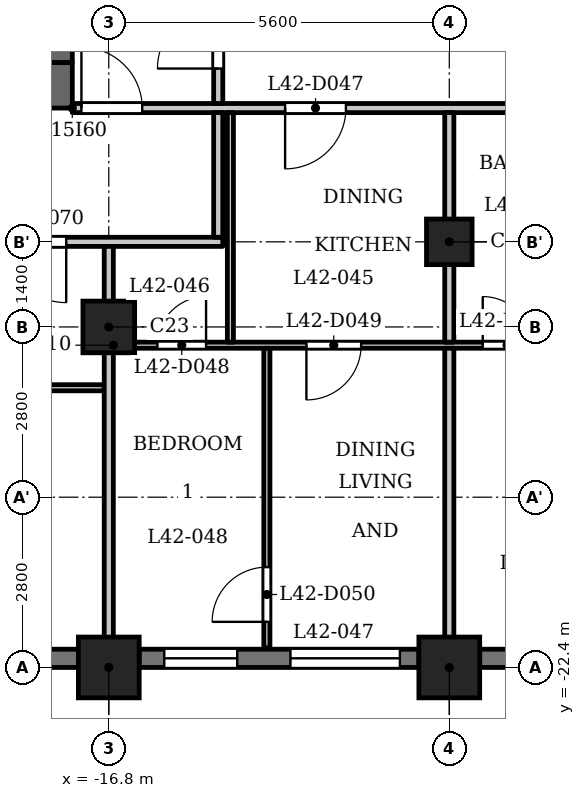
"""IFC4 building model, lengths in metres.
Left out: names, types, materials, properties, quantities, classifications, styles, units other than length and angle.
Written with IfcOpenShell. Run it as: python <this file> out.ifc"""

import sys

from ifc_helpers import new_model, si_unit, direction, frame, frame_2d, origin, origin_2d, place, context, subcontext, project, spatial, rectangle, extrude, element, fill, save


model = new_model("IFC4")
c1 = context("Model", 3, precision=1e-05, world=origin(), true_north=direction((0.0, 1.0)))
c2 = subcontext(c1, "Body", "Model", "MODEL_VIEW")
j1 = project(units=[si_unit("LENGTHUNIT", "METRE"), si_unit("PLANEANGLEUNIT", "RADIAN")], contexts=[c1])
p1 = place(None, origin())
s1 = spatial("IfcSite", under=j1, at=p1, CompositionType="ELEMENT")
p2 = place(p1, origin())
s2 = spatial("IfcBuilding", under=s1, at=p2, CompositionType="ELEMENT")
p3 = place(p2, frame((0.0, 0.0, 164.1)))
s3 = spatial("IfcBuildingStorey", under=s2, at=p3, CompositionType="ELEMENT", Elevation=164.1)
for number, where, z_axis, x_axis in (
    (1, (-16.8, -22.4, 0.0), (0.0, 0.0, 1.0), (1.0, 0.0, 0.0)),
    (2, (-11.2, -22.4, 0.0), (0.0, 0.0, 1.0), (1.0, 0.0, 0.0)),
):
    element("IfcColumn", number, at=place(p3, frame(where, z_axis=z_axis, x_axis=x_axis)), inside=s3, PredefinedType="COLUMN", context=c2, shape_type="SweptSolid", body=[
        extrude(rectangle(XDim=1.0, YDim=1.0, at=origin_2d()), origin(), (0.0, 0.0, 1.0), 3.5),
    ])
p4 = place(p3, frame((-16.8, -16.8, 0.0), z_axis=(0.0, 0.0, 1.0), x_axis=(1.0, 0.0, 0.0)))
e3 = element("IfcColumn", 3, at=p4, inside=s3, PredefinedType="COLUMN", context=c2, shape_type="SweptSolid", body=[
    extrude(rectangle(XDim=0.85, YDim=0.85, at=origin_2d()), origin(), (0.0, 0.0, 1.0), 3.5),
])
p5 = place(p3, frame((-11.2, -15.4, 0.0), z_axis=(0.0, 0.0, 1.0), x_axis=(1.0, 0.0, 0.0)))
e4 = element("IfcColumn", 4, at=p5, inside=s3, PredefinedType="COLUMN", context=c2, shape_type="SweptSolid", body=[
    extrude(rectangle(XDim=0.75, YDim=0.75, at=origin_2d()), origin(), (0.0, 0.0, 1.0), 3.5),
])
p6 = place(p3, frame((-20.0, -22.25, 0.0), z_axis=(0.0, 0.0, 1.0), x_axis=(1.0, 0.0, 0.0)))
e5 = element("IfcWall", 5, at=p6, inside=s3, PredefinedType="SOLIDWALL", context=c2, shape_type="SweptSolid", body=[
    extrude(rectangle(XDim=2.7, YDim=0.3, at=frame_2d((1.35, 0.0))), origin(), (0.0, 0.0, 1.0), 2.45),
])
p7 = place(p6, frame((0.75, 0.0, 0.6)))
e6 = element("IfcOpeningElement", 6, at=p7, cuts=e5, PredefinedType="OPENING", context=c2, shape_type="SweptSolid", body=[
    extrude(rectangle(XDim=1.2, YDim=1.55, at=frame_2d((0.6, 0.775))), frame((0.0, 0.16, 0.0), z_axis=(0.0, -1.0, 0.0), x_axis=(1.0, 0.0, 0.0)), (0.0, 0.0, 1.0), 0.32),
])
p8 = place(p3, frame((-16.3, -22.25, 0.0), z_axis=(0.0, 0.0, 1.0), x_axis=(1.0, 0.0, 0.0)))
e7 = element("IfcWall", 7, at=p8, inside=s3, PredefinedType="SOLIDWALL", context=c2, shape_type="SweptSolid", body=[
    extrude(rectangle(XDim=4.6, YDim=0.3, at=frame_2d((2.3, 0.0))), origin(), (0.0, 0.0, 1.0), 2.45),
])
p9 = place(p8, frame((0.413, 0.0, 0.6)))
e8 = element("IfcOpeningElement", 8, at=p9, cuts=e7, PredefinedType="OPENING", context=c2, shape_type="SweptSolid", body=[
    extrude(rectangle(XDim=1.2, YDim=1.55, at=frame_2d((0.6, 0.775))), frame((0.0, 0.16, 0.0), z_axis=(0.0, -1.0, 0.0), x_axis=(1.0, 0.0, 0.0)), (0.0, 0.0, 1.0), 0.32),
])
p10 = place(p8, frame((2.488, 0.0, 0.9)))
e9 = element("IfcOpeningElement", 9, at=p10, cuts=e7, PredefinedType="OPENING", context=c2, shape_type="SweptSolid", body=[
    extrude(rectangle(XDim=1.8, YDim=1.25, at=frame_2d((0.9, 0.625))), frame((0.0, 0.16, 0.0), z_axis=(0.0, -1.0, 0.0), x_axis=(1.0, 0.0, 0.0)), (0.0, 0.0, 1.0), 0.32),
])
p11 = place(p3, frame((-10.7, -22.25, 0.0), z_axis=(0.0, 0.0, 1.0), x_axis=(1.0, 0.0, 0.0)))
e10 = element("IfcWall", 10, at=p11, inside=s3, PredefinedType="SOLIDWALL", context=c2, shape_type="SweptSolid", body=[
    extrude(rectangle(XDim=4.6, YDim=0.3, at=frame_2d((2.3, 0.0))), origin(), (0.0, 0.0, 1.0), 2.45),
])
p12 = place(p11, frame((0.5, 0.0, 1.2)))
e11 = element("IfcOpeningElement", 11, at=p12, cuts=e10, PredefinedType="OPENING", context=c2, shape_type="SweptSolid", body=[
    extrude(rectangle(XDim=3.6, YDim=0.95, at=frame_2d((1.8, 0.475))), frame((0.0, 0.16, 0.0), z_axis=(0.0, -1.0, 0.0), x_axis=(1.0, 0.0, 0.0)), (0.0, 0.0, 1.0), 0.32),
])
p13 = place(p3, frame((-17.4, -12.825, 0.0), z_axis=(0.0, 0.0, 1.0), x_axis=(-1.0, 0.0, 0.0)))
e12 = element("IfcWall", 12, at=p13, inside=s3, PredefinedType="SHEAR", context=c2, shape_type="SweptSolid", body=[
    extrude(rectangle(XDim=10.4, YDim=0.75, at=frame_2d((5.2, 0.0))), origin(), (0.0, 0.0, 1.0), 3.2),
])
p14 = place(p3, frame((-17.6, -12.45, 0.0), z_axis=(0.0, 0.0, 1.0), x_axis=(0.0, 1.0, 0.0)))
e13 = element("IfcWall", 13, at=p14, inside=s3, PredefinedType="SHEAR", context=c2, shape_type="SweptSolid", body=[
    extrude(rectangle(XDim=24.9, YDim=0.4, at=frame_2d((12.45, 0.0))), origin(), (0.0, 0.0, 1.0), 3.2),
])
p15 = place(p14, frame((8.65, 0.0, 0.0)))
e14 = element("IfcOpeningElement", 14, at=p15, cuts=e13, PredefinedType="OPENING", context=c2, shape_type="SweptSolid", body=[
    extrude(rectangle(XDim=0.9, YDim=2.1, at=frame_2d((0.45, 1.05))), frame((0.0, 0.21, 0.0), z_axis=(0.0, -1.0, 0.0), x_axis=(1.0, 0.0, 0.0)), (0.0, 0.0, 1.0), 0.42),
])
p16 = place(p14, frame((15.6, 0.0, 0.0)))
e15 = element("IfcOpeningElement", 15, at=p16, cuts=e13, PredefinedType="OPENING", context=c2, shape_type="SweptSolid", body=[
    extrude(rectangle(XDim=1.1, YDim=2.1, at=frame_2d((0.55, 1.05))), frame((0.0, 0.21, 0.0), z_axis=(0.0, -1.0, 0.0), x_axis=(1.0, 0.0, 0.0)), (0.0, 0.0, 1.0), 0.42),
])
p17 = place(p14, frame((18.0, 0.0, 0.0)))
e16 = element("IfcOpeningElement", 16, at=p17, cuts=e13, PredefinedType="OPENING", context=c2, shape_type="SweptSolid", body=[
    extrude(rectangle(XDim=1.1, YDim=2.1, at=frame_2d((0.55, 1.05))), frame((0.0, 0.21, 0.0), z_axis=(0.0, -1.0, 0.0), x_axis=(1.0, 0.0, 0.0)), (0.0, 0.0, 1.0), 0.42),
])
p18 = place(p14, frame((23.025, 0.0, 0.0)))
e17 = element("IfcOpeningElement", 17, at=p18, cuts=e13, PredefinedType="OPENING", context=c2, shape_type="SweptSolid", body=[
    extrude(rectangle(XDim=1.1, YDim=2.1, at=frame_2d((0.55, 1.05))), frame((0.0, 0.21, 0.0), z_axis=(0.0, -1.0, 0.0), x_axis=(1.0, 0.0, 0.0)), (0.0, 0.0, 1.0), 0.42),
])
p19 = place(p14, frame((0.775, 0.0, 0.0)))
e18 = element("IfcOpeningElement", 18, at=p19, cuts=e13, PredefinedType="OPENING", context=c2, shape_type="SweptSolid", body=[
    extrude(rectangle(XDim=1.1, YDim=2.1, at=frame_2d((0.55, 1.05))), frame((0.0, 0.21, 0.0), z_axis=(0.0, -1.0, 0.0), x_axis=(1.0, 0.0, 0.0)), (0.0, 0.0, 1.0), 0.42),
])
p20 = place(p14, frame((12.925, 0.0, 0.0)))
e19 = element("IfcOpeningElement", 19, at=p20, cuts=e13, PredefinedType="OPENING", context=c2, shape_type="SweptSolid", body=[
    extrude(rectangle(XDim=1.8, YDim=2.1, at=frame_2d((0.9, 1.05))), frame((0.0, 0.21, 0.0), z_axis=(0.0, -1.0, 0.0), x_axis=(1.0, 0.0, 0.0)), (0.0, 0.0, 1.0), 0.42),
])
p21 = place(p3, frame((-26.394, -17.8, 0.0), z_axis=(0.0, 0.0, 1.0), x_axis=(1.0, 0.0, 0.0)))
e20 = element("IfcWall", 20, at=p21, inside=s3, PredefinedType="PARTITIONING", context=c2, shape_type="SweptSolid", body=[
    extrude(rectangle(XDim=9.519, YDim=0.1, at=frame_2d((4.76, 0.0))), origin(), (0.0, 0.0, 1.0), 3.2),
])
p22 = place(p21, frame((2.544, 0.0, 0.0)))
e21 = element("IfcOpeningElement", 21, at=p22, cuts=e20, PredefinedType="OPENING", context=c2, shape_type="SweptSolid", body=[
    extrude(rectangle(XDim=0.8, YDim=2.1, at=frame_2d((0.4, 1.05))), frame((0.0, 0.06, 0.0), z_axis=(0.0, -1.0, 0.0), x_axis=(1.0, 0.0, 0.0)), (0.0, 0.0, 1.0), 0.12),
])
p23 = place(p21, frame((6.894, 0.0, 0.0)))
e22 = element("IfcOpeningElement", 22, at=p23, cuts=e20, PredefinedType="OPENING", context=c2, shape_type="SweptSolid", body=[
    extrude(rectangle(XDim=0.9, YDim=2.1, at=frame_2d((0.45, 1.05))), frame((0.0, 0.06, 0.0), z_axis=(0.0, -1.0, 0.0), x_axis=(1.0, 0.0, 0.0)), (0.0, 0.0, 1.0), 0.12),
])
p24 = place(p3, frame((-16.725, -17.1, 0.0), z_axis=(0.0, 0.0, 1.0), x_axis=(1.0, 0.0, 0.0)))
e23 = element("IfcWall", 23, at=p24, inside=s3, PredefinedType="PARTITIONING", context=c2, shape_type="SweptSolid", body=[
    extrude(rectangle(XDim=33.45, YDim=0.1, at=frame_2d((16.725, 0.0))), origin(), (0.0, 0.0, 1.0), 3.2),
])
p25 = place(p24, frame((0.725, 0.0, 0.0)))
e24 = element("IfcOpeningElement", 24, at=p25, cuts=e23, PredefinedType="OPENING", context=c2, shape_type="SweptSolid", body=[
    extrude(rectangle(XDim=0.8, YDim=2.1, at=frame_2d((0.4, 1.05))), frame((0.0, 0.06, 0.0), z_axis=(0.0, -1.0, 0.0), x_axis=(1.0, 0.0, 0.0)), (0.0, 0.0, 1.0), 0.12),
])
p26 = place(p24, frame((3.175, 0.0, 0.0)))
e25 = element("IfcOpeningElement", 25, at=p26, cuts=e23, PredefinedType="OPENING", context=c2, shape_type="SweptSolid", body=[
    extrude(rectangle(XDim=0.9, YDim=2.1, at=frame_2d((0.45, 1.05))), frame((0.0, 0.06, 0.0), z_axis=(0.0, -1.0, 0.0), x_axis=(1.0, 0.0, 0.0)), (0.0, 0.0, 1.0), 0.12),
])
p27 = place(p24, frame((6.075, 0.0, 0.0)))
e26 = element("IfcOpeningElement", 26, at=p27, cuts=e23, PredefinedType="OPENING", context=c2, shape_type="SweptSolid", body=[
    extrude(rectangle(XDim=0.8, YDim=2.1, at=frame_2d((0.4, 1.05))), frame((0.0, 0.06, 0.0), z_axis=(0.0, -1.0, 0.0), x_axis=(1.0, 0.0, 0.0)), (0.0, 0.0, 1.0), 0.12),
])
p28 = place(p24, frame((9.425, 0.0, 0.0)))
e27 = element("IfcOpeningElement", 27, at=p28, cuts=e23, PredefinedType="OPENING", context=c2, shape_type="SweptSolid", body=[
    extrude(rectangle(XDim=0.9, YDim=2.1, at=frame_2d((0.45, 1.05))), frame((0.0, 0.06, 0.0), z_axis=(0.0, -1.0, 0.0), x_axis=(1.0, 0.0, 0.0)), (0.0, 0.0, 1.0), 0.12),
])
p29 = place(p24, frame((12.675, 0.0, 0.0)))
e28 = element("IfcOpeningElement", 28, at=p29, cuts=e23, PredefinedType="OPENING", context=c2, shape_type="SweptSolid", body=[
    extrude(rectangle(XDim=0.8, YDim=2.1, at=frame_2d((0.4, 1.05))), frame((0.0, 0.06, 0.0), z_axis=(0.0, -1.0, 0.0), x_axis=(1.0, 0.0, 0.0)), (0.0, 0.0, 1.0), 0.12),
])
p30 = place(p24, frame((15.275, 0.0, 0.0)))
e29 = element("IfcOpeningElement", 29, at=p30, cuts=e23, PredefinedType="OPENING", context=c2, shape_type="SweptSolid", body=[
    extrude(rectangle(XDim=0.9, YDim=2.1, at=frame_2d((0.45, 1.05))), frame((0.0, 0.06, 0.0), z_axis=(0.0, -1.0, 0.0), x_axis=(1.0, 0.0, 0.0)), (0.0, 0.0, 1.0), 0.12),
])
p31 = place(p24, frame((20.625, 0.0, 0.0)))
e30 = element("IfcOpeningElement", 30, at=p31, cuts=e23, PredefinedType="OPENING", context=c2, shape_type="SweptSolid", body=[
    extrude(rectangle(XDim=0.8, YDim=2.1, at=frame_2d((0.4, 1.05))), frame((0.0, 0.06, 0.0), z_axis=(0.0, -1.0, 0.0), x_axis=(1.0, 0.0, 0.0)), (0.0, 0.0, 1.0), 0.12),
])
p32 = place(p24, frame((17.375, 0.0, 0.0)))
e31 = element("IfcOpeningElement", 31, at=p32, cuts=e23, PredefinedType="OPENING", context=c2, shape_type="SweptSolid", body=[
    extrude(rectangle(XDim=0.9, YDim=2.1, at=frame_2d((0.45, 1.05))), frame((0.0, 0.06, 0.0), z_axis=(0.0, -1.0, 0.0), x_axis=(1.0, 0.0, 0.0)), (0.0, 0.0, 1.0), 0.12),
])
p33 = place(p24, frame((31.075, 0.0, 0.0)))
e32 = element("IfcOpeningElement", 32, at=p33, cuts=e23, PredefinedType="OPENING", context=c2, shape_type="SweptSolid", body=[
    extrude(rectangle(XDim=0.8, YDim=2.1, at=frame_2d((0.4, 1.05))), frame((0.0, 0.06, 0.0), z_axis=(0.0, -1.0, 0.0), x_axis=(1.0, 0.0, 0.0)), (0.0, 0.0, 1.0), 0.12),
])
p34 = place(p24, frame((29.325, 0.0, 0.0)))
e33 = element("IfcOpeningElement", 33, at=p34, cuts=e23, PredefinedType="OPENING", context=c2, shape_type="SweptSolid", body=[
    extrude(rectangle(XDim=0.9, YDim=2.1, at=frame_2d((0.45, 1.05))), frame((0.0, 0.06, 0.0), z_axis=(0.0, -1.0, 0.0), x_axis=(1.0, 0.0, 0.0)), (0.0, 0.0, 1.0), 0.12),
])
p35 = place(p24, frame((23.725, 0.0, 0.0)))
e34 = element("IfcOpeningElement", 34, at=p35, cuts=e23, PredefinedType="OPENING", context=c2, shape_type="SweptSolid", body=[
    extrude(rectangle(XDim=0.9, YDim=2.1, at=frame_2d((0.45, 1.05))), frame((0.0, 0.06, 0.0), z_axis=(0.0, -1.0, 0.0), x_axis=(1.0, 0.0, 0.0)), (0.0, 0.0, 1.0), 0.12),
])
p36 = place(p24, frame((25.775, 0.0, 0.0)))
e35 = element("IfcOpeningElement", 35, at=p36, cuts=e23, PredefinedType="OPENING", context=c2, shape_type="SweptSolid", body=[
    extrude(rectangle(XDim=0.9, YDim=2.1, at=frame_2d((0.45, 1.05))), frame((0.0, 0.06, 0.0), z_axis=(0.0, -1.0, 0.0), x_axis=(1.0, 0.0, 0.0)), (0.0, 0.0, 1.0), 0.12),
])
p37 = place(p3, frame((-27.484, -15.4, 0.0), z_axis=(0.0, 0.0, 1.0), x_axis=(1.0, 0.0, 0.0)))
e36 = element("IfcWall", 36, at=p37, inside=s3, PredefinedType="PARTITIONING", context=c2, shape_type="SweptSolid", body=[
    extrude(rectangle(XDim=12.559, YDim=0.15, at=frame_2d((6.279, 0.0))), origin(), (0.0, 0.0, 1.0), 3.2),
])
p38 = place(p37, frame((8.984, 0.0, 0.0)))
e37 = element("IfcOpeningElement", 37, at=p38, cuts=e36, PredefinedType="OPENING", context=c2, shape_type="SweptSolid", body=[
    extrude(rectangle(XDim=1.0, YDim=2.1, at=frame_2d((0.5, 1.05))), frame((0.0, 0.085, 0.0), z_axis=(0.0, -1.0, 0.0), x_axis=(1.0, 0.0, 0.0)), (0.0, 0.0, 1.0), 0.17),
])
p39 = place(p3, frame((-17.4, -13.2, 0.0), z_axis=(0.0, 0.0, 1.0), x_axis=(1.0, 0.0, 0.0)))
e38 = element("IfcWall", 38, at=p39, inside=s3, PredefinedType="PARTITIONING", context=c2, shape_type="SweptSolid", body=[
    extrude(rectangle(XDim=34.8, YDim=0.15, at=frame_2d((17.4, 0.0))), origin(), (0.0, 0.0, 1.0), 3.2),
])
p40 = place(p39, frame((0.15, 0.0, 0.0)))
e39 = element("IfcOpeningElement", 39, at=p40, cuts=e38, PredefinedType="OPENING", context=c2, shape_type="SweptSolid", body=[
    extrude(rectangle(XDim=1.0, YDim=2.1, at=frame_2d((0.5, 1.05))), frame((0.0, 0.085, 0.0), z_axis=(0.0, -1.0, 0.0), x_axis=(1.0, 0.0, 0.0)), (0.0, 0.0, 1.0), 0.17),
])
p41 = place(p39, frame((33.55, 0.0, 0.0)))
e40 = element("IfcOpeningElement", 40, at=p41, cuts=e38, PredefinedType="OPENING", context=c2, shape_type="SweptSolid", body=[
    extrude(rectangle(XDim=1.0, YDim=2.1, at=frame_2d((0.5, 1.05))), frame((0.0, 0.085, 0.0), z_axis=(0.0, -1.0, 0.0), x_axis=(1.0, 0.0, 0.0)), (0.0, 0.0, 1.0), 0.17),
])
p42 = place(p39, frame((3.5, 0.0, 0.0)))
e41 = element("IfcOpeningElement", 41, at=p42, cuts=e38, PredefinedType="OPENING", context=c2, shape_type="SweptSolid", body=[
    extrude(rectangle(XDim=1.0, YDim=2.1, at=frame_2d((0.5, 1.05))), frame((0.0, 0.085, 0.0), z_axis=(0.0, -1.0, 0.0), x_axis=(1.0, 0.0, 0.0)), (0.0, 0.0, 1.0), 0.17),
])
p43 = place(p39, frame((10.1, 0.0, 0.0)))
e42 = element("IfcOpeningElement", 42, at=p43, cuts=e38, PredefinedType="OPENING", context=c2, shape_type="SweptSolid", body=[
    extrude(rectangle(XDim=1.0, YDim=2.1, at=frame_2d((0.5, 1.05))), frame((0.0, 0.085, 0.0), z_axis=(0.0, -1.0, 0.0), x_axis=(1.0, 0.0, 0.0)), (0.0, 0.0, 1.0), 0.17),
])
p44 = place(p39, frame((15.7, 0.0, 0.0)))
e43 = element("IfcOpeningElement", 43, at=p44, cuts=e38, PredefinedType="OPENING", context=c2, shape_type="SweptSolid", body=[
    extrude(rectangle(XDim=1.0, YDim=2.1, at=frame_2d((0.5, 1.05))), frame((0.0, 0.085, 0.0), z_axis=(0.0, -1.0, 0.0), x_axis=(1.0, 0.0, 0.0)), (0.0, 0.0, 1.0), 0.17),
])
p45 = place(p39, frame((18.05, 0.0, 0.0)))
e44 = element("IfcOpeningElement", 44, at=p45, cuts=e38, PredefinedType="OPENING", context=c2, shape_type="SweptSolid", body=[
    extrude(rectangle(XDim=1.0, YDim=2.1, at=frame_2d((0.5, 1.05))), frame((0.0, 0.085, 0.0), z_axis=(0.0, -1.0, 0.0), x_axis=(1.0, 0.0, 0.0)), (0.0, 0.0, 1.0), 0.17),
])
p46 = place(p39, frame((26.9, 0.0, 0.0)))
e45 = element("IfcOpeningElement", 45, at=p46, cuts=e38, PredefinedType="OPENING", context=c2, shape_type="SweptSolid", body=[
    extrude(rectangle(XDim=1.0, YDim=2.1, at=frame_2d((0.5, 1.05))), frame((0.0, 0.085, 0.0), z_axis=(0.0, -1.0, 0.0), x_axis=(1.0, 0.0, 0.0)), (0.0, 0.0, 1.0), 0.17),
])
p47 = place(p3, frame((-16.8, -22.88, 0.0), z_axis=(0.0, 0.0, 1.0), x_axis=(0.0, 1.0, 0.0)))
e46 = element("IfcWall", 46, at=p47, inside=s3, PredefinedType="PARTITIONING", context=c2, shape_type="SweptSolid", body=[
    extrude(rectangle(XDim=7.405, YDim=0.15, at=frame_2d((3.702, 0.0))), origin(), (0.0, 0.0, 1.0), 3.2),
])
p48 = place(p3, frame((-15.0, -15.325, 0.0), z_axis=(0.0, 0.0, 1.0), x_axis=(0.0, 1.0, 0.0)))
e47 = element("IfcWall", 47, at=p48, inside=s3, PredefinedType="PARTITIONING", context=c2, shape_type="SweptSolid", body=[
    extrude(rectangle(XDim=2.05, YDim=0.15, at=frame_2d((1.025, 0.0))), origin(), (0.0, 0.0, 1.0), 3.2),
])
p49 = place(p3, frame((-15.0, -13.125, 0.0), z_axis=(0.0, 0.0, 1.0), x_axis=(0.0, 1.0, 0.0)))
e48 = element("IfcWall", 48, at=p49, inside=s3, PredefinedType="PARTITIONING", context=c2, shape_type="SweptSolid", body=[
    extrude(rectangle(XDim=6.356, YDim=0.15, at=frame_2d((3.178, 0.0))), origin(), (0.0, 0.0, 1.0), 3.2),
])
p50 = place(p49, frame((0.575, 0.0, 0.0)))
e49 = element("IfcOpeningElement", 49, at=p50, cuts=e48, PredefinedType="OPENING", context=c2, shape_type="SweptSolid", body=[
    extrude(rectangle(XDim=1.0, YDim=2.1, at=frame_2d((0.5, 1.05))), frame((0.0, 0.085, 0.0), z_axis=(0.0, -1.0, 0.0), x_axis=(1.0, 0.0, 0.0)), (0.0, 0.0, 1.0), 0.17),
])
p51 = place(p3, frame((-14.8, -17.05, 0.0), z_axis=(0.0, 0.0, 1.0), x_axis=(0.0, 1.0, 0.0)))
e50 = element("IfcWall", 50, at=p51, inside=s3, PredefinedType="PARTITIONING", context=c2, shape_type="SweptSolid", body=[
    extrude(rectangle(XDim=3.775, YDim=0.1, at=frame_2d((1.888, 0.0))), origin(), (0.0, 0.0, 1.0), 3.2),
])
p52 = place(p3, frame((-14.2, -22.08, 0.0), z_axis=(0.0, 0.0, 1.0), x_axis=(0.0, 1.0, 0.0)))
e51 = element("IfcWall", 51, at=p52, inside=s3, PredefinedType="PARTITIONING", context=c2, shape_type="SweptSolid", body=[
    extrude(rectangle(XDim=4.93, YDim=0.1, at=frame_2d((2.465, 0.0))), origin(), (0.0, 0.0, 1.0), 3.2),
])
p53 = place(p52, frame((0.43, 0.0, 0.0)))
e52 = element("IfcOpeningElement", 52, at=p53, cuts=e51, PredefinedType="OPENING", context=c2, shape_type="SweptSolid", body=[
    extrude(rectangle(XDim=0.9, YDim=2.1, at=frame_2d((0.45, 1.05))), frame((0.0, 0.06, 0.0), z_axis=(0.0, -1.0, 0.0), x_axis=(1.0, 0.0, 0.0)), (0.0, 0.0, 1.0), 0.12),
])
p54 = place(p3, frame((-11.2, -22.88, 0.0), z_axis=(0.0, 0.0, 1.0), x_axis=(0.0, 1.0, 0.0)))
e53 = element("IfcWall", 53, at=p54, inside=s3, PredefinedType="PARTITIONING", context=c2, shape_type="SweptSolid", body=[
    extrude(rectangle(XDim=5.73, YDim=0.15, at=frame_2d((2.865, 0.0))), origin(), (0.0, 0.0, 1.0), 3.2),
])
p55 = place(p3, frame((-11.2, -17.05, 0.0), z_axis=(0.0, 0.0, 1.0), x_axis=(0.0, 1.0, 0.0)))
e54 = element("IfcWall", 54, at=p55, inside=s3, PredefinedType="PARTITIONING", context=c2, shape_type="SweptSolid", body=[
    extrude(rectangle(XDim=3.775, YDim=0.15, at=frame_2d((1.888, 0.0))), origin(), (0.0, 0.0, 1.0), 3.2),
])
p56 = place(p50, origin())
e55 = element("IfcDoor", 55, at=p56, inside=s3, OperationType="SINGLE_SWING_RIGHT", PredefinedType="DOOR", context=c2, shape_type="SweptSolid", body=[
    extrude(rectangle(XDim=1.0, YDim=2.1, at=frame_2d((0.5, 1.05))), frame((0.0, 0.025, 0.0), z_axis=(0.0, -1.0, 0.0), x_axis=(1.0, 0.0, 0.0)), (0.0, 0.0, 1.0), 0.05),
])
fill(e49, e55)
p57 = place(p40, origin())
e56 = element("IfcDoor", 56, at=p57, inside=s3, OperationType="SINGLE_SWING_RIGHT", PredefinedType="DOOR", context=c2, shape_type="SweptSolid", body=[
    extrude(rectangle(XDim=1.0, YDim=2.1, at=frame_2d((0.5, 1.05))), frame((0.0, 0.025, 0.0), z_axis=(0.0, -1.0, 0.0), x_axis=(1.0, 0.0, 0.0)), (0.0, 0.0, 1.0), 0.05),
])
fill(e39, e56)
p58 = place(p42, origin())
e57 = element("IfcDoor", 57, at=p58, inside=s3, OperationType="SINGLE_SWING_LEFT", PredefinedType="DOOR", context=c2, shape_type="SweptSolid", body=[
    extrude(rectangle(XDim=1.0, YDim=2.1, at=frame_2d((0.5, 1.05))), frame((0.0, 0.025, 0.0), z_axis=(0.0, -1.0, 0.0), x_axis=(1.0, 0.0, 0.0)), (0.0, 0.0, 1.0), 0.05),
])
fill(e41, e57)
p59 = place(p25, origin())
e58 = element("IfcDoor", 58, at=p59, inside=s3, OperationType="SINGLE_SWING_LEFT", PredefinedType="DOOR", context=c2, shape_type="SweptSolid", body=[
    extrude(rectangle(XDim=0.8, YDim=2.1, at=frame_2d((0.4, 1.05))), frame((0.0, 0.025, 0.0), z_axis=(0.0, -1.0, 0.0), x_axis=(1.0, 0.0, 0.0)), (0.0, 0.0, 1.0), 0.05),
])
fill(e24, e58)
p60 = place(p26, origin())
e59 = element("IfcDoor", 59, at=p60, inside=s3, OperationType="SINGLE_SWING_LEFT", PredefinedType="DOOR", context=c2, shape_type="SweptSolid", body=[
    extrude(rectangle(XDim=0.9, YDim=2.1, at=frame_2d((0.45, 1.05))), frame((0.0, 0.025, 0.0), z_axis=(0.0, -1.0, 0.0), x_axis=(1.0, 0.0, 0.0)), (0.0, 0.0, 1.0), 0.05),
])
fill(e25, e59)
p61 = place(p53, origin())
e60 = element("IfcDoor", 60, at=p61, inside=s3, OperationType="SINGLE_SWING_RIGHT", PredefinedType="DOOR", context=c2, shape_type="SweptSolid", body=[
    extrude(rectangle(XDim=0.9, YDim=2.1, at=frame_2d((0.45, 1.05))), frame((0.0, 0.025, 0.0), z_axis=(0.0, -1.0, 0.0), x_axis=(1.0, 0.0, 0.0)), (0.0, 0.0, 1.0), 0.05),
])
fill(e52, e60)
p62 = place(p27, origin())
e61 = element("IfcDoor", 61, at=p62, inside=s3, OperationType="SINGLE_SWING_RIGHT", PredefinedType="DOOR", context=c2, shape_type="SweptSolid", body=[
    extrude(rectangle(XDim=0.8, YDim=2.1, at=frame_2d((0.4, 1.05))), frame((0.0, 0.025, 0.0), z_axis=(0.0, -1.0, 0.0), x_axis=(1.0, 0.0, 0.0)), (0.0, 0.0, 1.0), 0.05),
])
fill(e26, e61)
p63 = place(p38, origin())
e62 = element("IfcDoor", 62, at=p63, inside=s3, OperationType="SINGLE_SWING_RIGHT", PredefinedType="DOOR", context=c2, shape_type="SweptSolid", body=[
    extrude(rectangle(XDim=1.0, YDim=2.1, at=frame_2d((0.5, 1.05))), frame((0.0, 0.025, 0.0), z_axis=(0.0, -1.0, 0.0), x_axis=(1.0, 0.0, 0.0)), (0.0, 0.0, 1.0), 0.05),
])
fill(e37, e62)
p64 = place(p9, origin())
e63 = element("IfcWindow", 63, at=p64, inside=s3, PartitioningType="SINGLE_PANEL", PredefinedType="WINDOW", context=c2, shape_type="SweptSolid", body=[
    extrude(rectangle(XDim=1.2, YDim=1.55, at=frame_2d((0.6, 0.775))), frame((0.0, 0.03, 0.0), z_axis=(0.0, -1.0, 0.0), x_axis=(1.0, 0.0, 0.0)), (0.0, 0.0, 1.0), 0.06),
])
fill(e8, e63)
p65 = place(p10, origin())
e64 = element("IfcWindow", 64, at=p65, inside=s3, PartitioningType="SINGLE_PANEL", PredefinedType="WINDOW", context=c2, shape_type="SweptSolid", body=[
    extrude(rectangle(XDim=1.8, YDim=1.25, at=frame_2d((0.9, 0.625))), frame((0.0, 0.03, 0.0), z_axis=(0.0, -1.0, 0.0), x_axis=(1.0, 0.0, 0.0)), (0.0, 0.0, 1.0), 0.06),
])
fill(e9, e64)
save(model, sys.argv[1])
